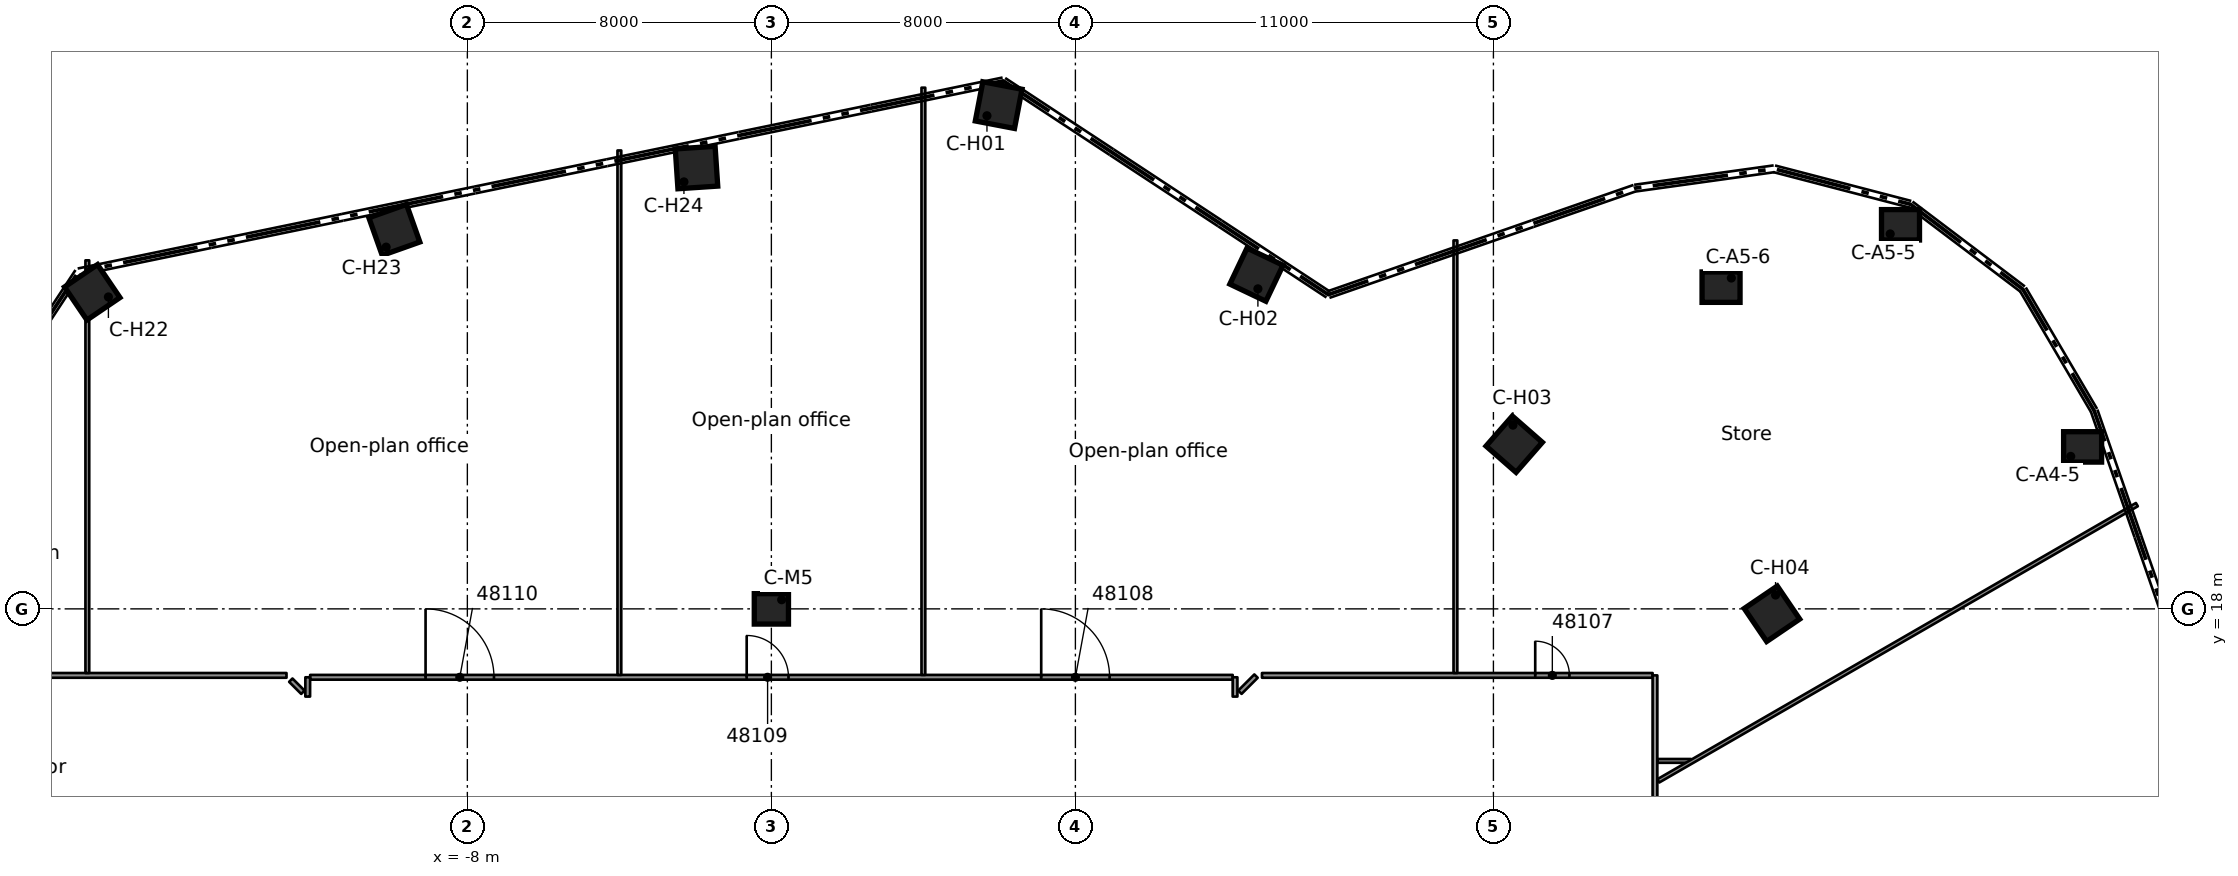
"""IFC4 building model, lengths in metres.
Left out: names, types, materials, properties, quantities, classifications, styles, units other than length and angle.
Written with IfcOpenShell. Run it as: python <this file> out.ifc"""

import sys

from ifc_helpers import new_model, si_unit, direction, frame, frame_2d, origin, origin_2d, place, context, subcontext, project, spatial, rectangle, extrude, element, fill, save


model = new_model("IFC4")
c1 = context("Model", 3, precision=1e-05, world=origin(), true_north=direction((0.0, 1.0)))
c2 = subcontext(c1, "Body", "Model", "MODEL_VIEW")
j1 = project(units=[si_unit("LENGTHUNIT", "METRE"), si_unit("PLANEANGLEUNIT", "RADIAN")], contexts=[c1])
p1 = place(None, origin())
s1 = spatial("IfcSite", under=j1, at=p1, CompositionType="ELEMENT")
p2 = place(p1, origin())
s2 = spatial("IfcBuilding", under=s1, at=p2, CompositionType="ELEMENT")
p3 = place(p2, frame((0.0, 0.0, 235.5)))
s3 = spatial("IfcBuildingStorey", under=s2, at=p3, CompositionType="ELEMENT", Elevation=235.5)
for number, where, z_axis, x_axis in (
    (1, (34.504, 22.262, 0.0), (0.0, 0.0, 1.0), (1.0, 0.0, 0.0)),
    (2, (29.712, 28.106, 0.0), (0.0, 0.0, 1.0), (1.0, 0.0, 0.0)),
    (3, (24.99, 26.465, 0.0), (0.0, 0.0, 1.0), (1.0, 0.0, 0.0)),
):
    element("IfcColumn", number, at=place(p3, frame(where, z_axis=z_axis, x_axis=x_axis)), inside=s3, PredefinedType="COLUMN", context=c2, shape_type="SweptSolid", body=[
        extrude(rectangle(XDim=1.0, YDim=0.8, at=origin_2d()), origin(), (0.0, 0.0, 1.0), 3.5),
    ])
for number, where, z_axis, x_axis in (
    (4, (5.981, 31.255, 0.0), (0.0, 0.0, 1.0), (0.188, 0.982, 0.0)),
    (5, (12.764, 26.794, 0.0), (0.0, 0.0, 1.0), (0.43, 0.903, 0.0)),
    (6, (19.547, 22.333, 0.0), (0.0, 0.0, 1.0), (0.659, 0.752, 0.0)),
    (7, (26.33, 17.871, 0.0), (0.0, 0.0, 1.0), (0.827, 0.562, 0.0)),
    (8, (-17.871, 26.33, 0.0), (0.0, 0.0, 1.0), (-0.562, 0.827, 0.0)),
    (9, (-9.921, 27.972, 0.0), (0.0, 0.0, 1.0), (-0.334, 0.942, 0.0)),
    (10, (-1.97, 29.613, 0.0), (0.0, 0.0, 1.0), (-0.066, 0.998, 0.0)),
):
    element("IfcColumn", number, at=place(p3, frame(where, z_axis=z_axis, x_axis=x_axis)), inside=s3, PredefinedType="COLUMN", context=c2, shape_type="SweptSolid", body=[
        extrude(rectangle(XDim=1.05, YDim=1.05, at=origin_2d()), origin(), (0.0, 0.0, 1.0), 3.5),
    ])
p4 = place(p3, frame((0.0, 18.0, 0.0), z_axis=(0.0, 0.0, 1.0), x_axis=(1.0, 0.0, 0.0)))
e11 = element("IfcColumn", 11, at=p4, inside=s3, PredefinedType="COLUMN", context=c2, shape_type="SweptSolid", body=[
    extrude(rectangle(XDim=0.9, YDim=0.8, at=origin_2d()), origin(), (0.0, 0.0, 1.0), 3.5),
])
p5 = place(p3, frame((-12.646, 16.124, 0.0), z_axis=(0.0, 0.0, 1.0), x_axis=(0.707106781187, -0.707106781187, 0.0)))
e12 = element("IfcWall", 12, at=p5, inside=s3, PredefinedType="PARTITIONING", context=c2, shape_type="SweptSolid", body=[
    extrude(rectangle(XDim=0.45, YDim=0.125, at=frame_2d((0.225, 0.0))), origin(), (0.0, 0.0, 1.0), 3.08),
])
p6 = place(p3, frame((23.314, 14.0, 0.0), z_axis=(0.0, 0.0, 1.0), x_axis=(1.0, 0.0, 0.0)))
e13 = element("IfcWall", 13, at=p6, inside=s3, PredefinedType="PARTITIONING", context=c2, shape_type="SweptSolid", body=[
    extrude(rectangle(XDim=0.885, YDim=0.1, at=frame_2d((0.442, 0.0))), origin(), (0.0, 0.0, 1.0), 3.08),
])
p7 = place(p3, frame((-12.137, 16.2, 0.0), z_axis=(0.0, 0.0, 1.0), x_axis=(1.0, 0.0, 0.0)))
e14 = element("IfcWall", 14, at=p7, inside=s3, PredefinedType="PARTITIONING", context=c2, shape_type="SweptSolid", body=[
    extrude(rectangle(XDim=24.276, YDim=0.125, at=frame_2d((12.138, 0.0))), origin(), (0.0, 0.0, 1.0), 3.08),
])
p8 = place(p7, frame((19.238, 0.0, 0.0)))
e15 = element("IfcOpeningElement", 15, at=p8, cuts=e14, PredefinedType="OPENING", context=c2, shape_type="SweptSolid", body=[
    extrude(rectangle(XDim=1.8, YDim=2.1, at=frame_2d((0.9, 1.05))), frame((0.0, 0.073, 0.0), z_axis=(0.0, -1.0, 0.0), x_axis=(1.0, 0.0, 0.0)), (0.0, 0.0, 1.0), 0.145),
])
p9 = place(p7, frame((11.488, 0.0, 0.0)))
e16 = element("IfcOpeningElement", 16, at=p9, cuts=e14, PredefinedType="OPENING", context=c2, shape_type="SweptSolid", body=[
    extrude(rectangle(XDim=1.1, YDim=2.1, at=frame_2d((0.55, 1.05))), frame((0.0, 0.073, 0.0), z_axis=(0.0, -1.0, 0.0), x_axis=(1.0, 0.0, 0.0)), (0.0, 0.0, 1.0), 0.145),
])
p10 = place(p7, frame((3.038, 0.0, 0.0)))
e17 = element("IfcOpeningElement", 17, at=p10, cuts=e14, PredefinedType="OPENING", context=c2, shape_type="SweptSolid", body=[
    extrude(rectangle(XDim=1.8, YDim=2.1, at=frame_2d((0.9, 1.05))), frame((0.0, 0.073, 0.0), z_axis=(0.0, -1.0, 0.0), x_axis=(1.0, 0.0, 0.0)), (0.0, 0.0, 1.0), 0.145),
])
p11 = place(p3, frame((-23.188, 16.25, 0.0), z_axis=(0.0, 0.0, 1.0), x_axis=(1.0, 0.0, 0.0)))
e18 = element("IfcWall", 18, at=p11, inside=s3, PredefinedType="PARTITIONING", context=c2, shape_type="SweptSolid", body=[
    extrude(rectangle(XDim=10.429, YDim=0.125, at=frame_2d((5.214, 0.0))), origin(), (0.0, 0.0, 1.0), 3.08),
])
p12 = place(p11, frame((2.038, 0.0, 0.0)))
e19 = element("IfcOpeningElement", 19, at=p12, cuts=e18, PredefinedType="OPENING", context=c2, shape_type="SweptSolid", body=[
    extrude(rectangle(XDim=1.0, YDim=2.1, at=frame_2d((0.5, 1.05))), frame((0.0, 0.073, 0.0), z_axis=(0.0, -1.0, 0.0), x_axis=(1.0, 0.0, 0.0)), (0.0, 0.0, 1.0), 0.145),
])
p13 = place(p3, frame((12.91, 16.25, 0.0), z_axis=(0.0, 0.0, 1.0), x_axis=(1.0, 0.0, 0.0)))
e20 = element("IfcWall", 20, at=p13, inside=s3, PredefinedType="PARTITIONING", context=c2, shape_type="SweptSolid", body=[
    extrude(rectangle(XDim=10.279, YDim=0.125, at=frame_2d((5.14, 0.0))), origin(), (0.0, 0.0, 1.0), 3.08),
])
p14 = place(p13, frame((7.19, 0.0, 0.0)))
e21 = element("IfcOpeningElement", 21, at=p14, cuts=e20, PredefinedType="OPENING", context=c2, shape_type="SweptSolid", body=[
    extrude(rectangle(XDim=0.9, YDim=2.1, at=frame_2d((0.45, 1.05))), frame((0.0, 0.073, 0.0), z_axis=(0.0, -1.0, 0.0), x_axis=(1.0, 0.0, 0.0)), (0.0, 0.0, 1.0), 0.145),
])
p15 = place(p3, frame((23.338, 13.474, 0.0), z_axis=(0.0, 0.0, 1.0), x_axis=(0.866095287821, 0.499878937759, 0.0)))
e22 = element("IfcWall", 22, at=p15, inside=s3, PredefinedType="PARTITIONING", context=c2, shape_type="SweptSolid", body=[
    extrude(rectangle(XDim=14.541, YDim=0.1, at=frame_2d((7.271, 0.0))), origin(), (0.0, 0.0, 1.0), 3.08),
])
p16 = place(p3, frame((12.329, 15.807, 0.0), z_axis=(0.0, 0.0, 1.0), x_axis=(0.706903150737, 0.707310353012, 0.0)))
e23 = element("IfcWall", 23, at=p16, inside=s3, PredefinedType="PARTITIONING", context=c2, shape_type="SweptSolid", body=[
    extrude(rectangle(XDim=0.6, YDim=0.125, at=frame_2d((0.3, 0.0))), origin(), (0.0, 0.0, 1.0), 3.08),
])
p17 = place(p3, frame((-12.201, 15.692, 0.0), z_axis=(0.0, 0.0, 1.0), x_axis=(0.00192214926, 0.999998152669, 0.0)))
e24 = element("IfcWall", 24, at=p17, inside=s3, PredefinedType="PARTITIONING", context=c2, shape_type="SweptSolid", body=[
    extrude(rectangle(XDim=0.508, YDim=0.125, at=frame_2d((0.254, 0.0))), origin(), (0.0, 0.0, 1.0), 3.08),
])
p18 = place(p3, frame((23.251, 16.25, 0.0), z_axis=(0.0, 0.0, 1.0), x_axis=(0.0, -1.0, 0.0)))
e25 = element("IfcWall", 25, at=p18, inside=s3, PredefinedType="PARTITIONING", context=c2, shape_type="SweptSolid", body=[
    extrude(rectangle(XDim=32.5, YDim=0.125, at=frame_2d((16.25, 0.0))), origin(), (0.0, 0.0, 1.0), 3.08),
])
p19 = place(p18, frame((26.063, 0.0, 0.0)))
e26 = element("IfcOpeningElement", 26, at=p19, cuts=e25, PredefinedType="OPENING", context=c2, shape_type="SweptSolid", body=[
    extrude(rectangle(XDim=1.8, YDim=2.1, at=frame_2d((0.9, 1.05))), frame((0.0, 0.073, 0.0), z_axis=(0.0, -1.0, 0.0), x_axis=(1.0, 0.0, 0.0)), (0.0, 0.0, 1.0), 0.145),
])
p20 = place(p18, frame((9.676, 0.0, 0.0)))
e27 = element("IfcOpeningElement", 27, at=p20, cuts=e25, PredefinedType="OPENING", context=c2, shape_type="SweptSolid", body=[
    extrude(rectangle(XDim=1.8, YDim=2.1, at=frame_2d((0.9, 1.05))), frame((0.0, 0.073, 0.0), z_axis=(0.0, -1.0, 0.0), x_axis=(1.0, 0.0, 0.0)), (0.0, 0.0, 1.0), 0.145),
])
p21 = place(p18, frame((18.6, 0.0, 0.0)))
e28 = element("IfcOpeningElement", 28, at=p21, cuts=e25, PredefinedType="OPENING", context=c2, shape_type="SweptSolid", body=[
    extrude(rectangle(XDim=0.9, YDim=2.1, at=frame_2d((0.45, 1.05))), frame((0.0, 0.073, 0.0), z_axis=(0.0, -1.0, 0.0), x_axis=(1.0, 0.0, 0.0)), (0.0, 0.0, 1.0), 0.145),
])
p22 = place(p3, frame((18.0, 16.312, 0.0), z_axis=(0.0, 0.0, 1.0), x_axis=(0.0, 1.0, 0.0)))
e29 = element("IfcWall", 29, at=p22, inside=s3, PredefinedType="PARTITIONING", context=c2, shape_type="SweptSolid", body=[
    extrude(rectangle(XDim=11.383, YDim=0.1, at=frame_2d((5.691, 0.0))), origin(), (0.0, 0.0, 1.0), 3.08),
])
p23 = place(p3, frame((12.201, 15.692, 0.0), z_axis=(0.0, 0.0, 1.0), x_axis=(0.0, 1.0, 0.0)))
e30 = element("IfcWall", 30, at=p23, inside=s3, PredefinedType="PARTITIONING", context=c2, shape_type="SweptSolid", body=[
    extrude(rectangle(XDim=0.508, YDim=0.125, at=frame_2d((0.254, 0.0))), origin(), (0.0, 0.0, 1.0), 3.08),
])
p24 = place(p3, frame((4.0, 16.262, 0.0), z_axis=(0.0, 0.0, 1.0), x_axis=(0.0, 1.0, 0.0)))
e31 = element("IfcWall", 31, at=p24, inside=s3, PredefinedType="PARTITIONING", context=c2, shape_type="SweptSolid", body=[
    extrude(rectangle(XDim=15.452, YDim=0.1, at=frame_2d((7.726, 0.0))), origin(), (0.0, 0.0, 1.0), 3.08),
])
p25 = place(p3, frame((-4.0, 16.262, 0.0), z_axis=(0.0, 0.0, 1.0), x_axis=(0.0, 1.0, 0.0)))
e32 = element("IfcWall", 32, at=p25, inside=s3, PredefinedType="PARTITIONING", context=c2, shape_type="SweptSolid", body=[
    extrude(rectangle(XDim=13.8, YDim=0.1, at=frame_2d((6.9, 0.0))), origin(), (0.0, 0.0, 1.0), 3.08),
])
p26 = place(p3, frame((-18.0, 16.312, 0.0), z_axis=(0.0, 0.0, 1.0), x_axis=(0.0, 1.0, 0.0)))
e33 = element("IfcWall", 33, at=p26, inside=s3, PredefinedType="PARTITIONING", context=c2, shape_type="SweptSolid", body=[
    extrude(rectangle(XDim=10.859, YDim=0.1, at=frame_2d((5.429, 0.0))), origin(), (0.0, 0.0, 1.0), 3.08),
])
p27 = place(p14, origin())
e34 = element("IfcDoor", 34, at=p27, inside=s3, OperationType="SINGLE_SWING_RIGHT", PredefinedType="DOOR", context=c2, shape_type="SweptSolid", body=[
    extrude(rectangle(XDim=0.9, YDim=2.1, at=frame_2d((0.45, 1.05))), frame((0.0, 0.025, 0.0), z_axis=(0.0, -1.0, 0.0), x_axis=(1.0, 0.0, 0.0)), (0.0, 0.0, 1.0), 0.05),
])
fill(e21, e34)
p28 = place(p8, origin())
e35 = element("IfcDoor", 35, at=p28, inside=s3, OperationType="DOUBLE_DOOR_SINGLE_SWING", PredefinedType="DOOR", context=c2, shape_type="SweptSolid", body=[
    extrude(rectangle(XDim=1.8, YDim=2.1, at=frame_2d((0.9, 1.05))), frame((0.0, 0.025, 0.0), z_axis=(0.0, -1.0, 0.0), x_axis=(1.0, 0.0, 0.0)), (0.0, 0.0, 1.0), 0.05),
])
fill(e15, e35)
p29 = place(p9, origin())
e36 = element("IfcDoor", 36, at=p29, inside=s3, OperationType="SINGLE_SWING_LEFT", PredefinedType="DOOR", context=c2, shape_type="SweptSolid", body=[
    extrude(rectangle(XDim=1.1, YDim=2.1, at=frame_2d((0.55, 1.05))), frame((0.0, 0.025, 0.0), z_axis=(0.0, -1.0, 0.0), x_axis=(1.0, 0.0, 0.0)), (0.0, 0.0, 1.0), 0.05),
])
fill(e16, e36)
p30 = place(p10, origin())
e37 = element("IfcDoor", 37, at=p30, inside=s3, OperationType="DOUBLE_DOOR_SINGLE_SWING", PredefinedType="DOOR", context=c2, shape_type="SweptSolid", body=[
    extrude(rectangle(XDim=1.8, YDim=2.1, at=frame_2d((0.9, 1.05))), frame((0.0, 0.025, 0.0), z_axis=(0.0, -1.0, 0.0), x_axis=(1.0, 0.0, 0.0)), (0.0, 0.0, 1.0), 0.05),
])
fill(e17, e37)
save(model, sys.argv[1])
